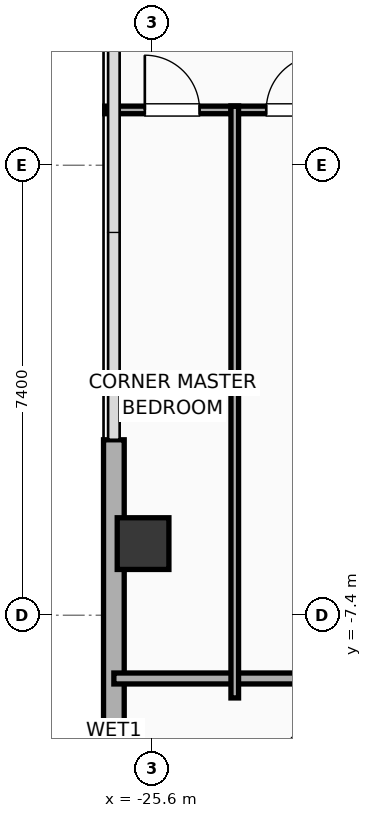
"""IFC4 building model, lengths in metres.
Left out: names, types, materials, properties, quantities, classifications, styles, units other than length and angle.
Written with IfcOpenShell. Run it as: python <this file> out.ifc"""

import sys

from ifc_helpers import new_model, si_unit, direction, frame, frame_2d, origin, origin_2d, place, context, subcontext, project, spatial, rectangle, hollow_rectangle, extrude, element, fill, save


model = new_model("IFC4")
c1 = context("Model", 3, precision=1e-05, world=origin(), true_north=direction((0.0, 1.0)))
c2 = subcontext(c1, "Body", "Model", "MODEL_VIEW")
j1 = project(units=[si_unit("LENGTHUNIT", "METRE"), si_unit("PLANEANGLEUNIT", "RADIAN")], contexts=[c1])
p1 = place(None, origin())
s1 = spatial("IfcSite", under=j1, at=p1, CompositionType="ELEMENT")
p2 = place(p1, origin())
s2 = spatial("IfcBuilding", under=s1, at=p2, CompositionType="ELEMENT")
p3 = place(p2, frame((0.0, 0.0, 211.9)))
s3 = spatial("IfcBuildingStorey", under=s2, at=p3, CompositionType="ELEMENT", Elevation=211.9)
p4 = place(p3, frame((-25.75, -6.222, 0.0), z_axis=(0.0, 0.0, 1.0), x_axis=(1.0, 0.0, 0.0)))
e1 = element("IfcColumn", 1, at=p4, inside=s3, PredefinedType="COLUMN", context=c2, shape_type="SweptSolid", body=[
    extrude(hollow_rectangle(XDim=0.85, YDim=0.85, WallThickness=0.028, at=origin_2d()), origin(), (0.0, 0.0, 1.0), 3.9),
])
p5 = place(p3, frame((-26.23, -15.383, 0.0), z_axis=(0.0, 0.0, 1.0), x_axis=(0.0, 1.0, 0.0)))
e2 = element("IfcWall", 2, at=p5, inside=s3, PredefinedType="ELEMENTEDWALL", context=c2, shape_type="SweptSolid", body=[
    extrude(rectangle(XDim=10.869, YDim=0.34, at=frame_2d((5.434, 0.0))), origin(), (0.0, 0.0, 1.0), 3.65),
])
p6 = place(p3, frame((-26.23, -8.44, 0.0), z_axis=(0.0, 0.0, 1.0), x_axis=(1.0, 0.0, 0.0)))
e3 = element("IfcWall", 3, at=p6, inside=s3, PredefinedType="PARTITIONING", context=c2, shape_type="SweptSolid", body=[
    extrude(rectangle(XDim=16.35, YDim=0.18, at=frame_2d((8.175, 0.0))), origin(), (0.0, 0.0, 1.0), 3.65),
])
p7 = place(p3, frame((-26.38, 0.91, 0.0), z_axis=(0.0, 0.0, 1.0), x_axis=(1.0, 0.0, 0.0)))
e4 = element("IfcWall", 4, at=p7, inside=s3, PredefinedType="PARTITIONING", context=c2, shape_type="SweptSolid", body=[
    extrude(rectangle(XDim=2.2, YDim=0.125, at=frame_2d((1.1, 0.0))), origin(), (0.0, 0.0, 1.0), 3.65),
])
p8 = place(p7, frame((0.659, 0.0, 0.0)))
e5 = element("IfcOpeningElement", 5, at=p8, cuts=e4, PredefinedType="OPENING", context=c2, shape_type="SweptSolid", body=[
    extrude(rectangle(XDim=0.9, YDim=2.05, at=frame_2d((0.45, 1.025))), frame((0.0, 0.073, 0.0), z_axis=(0.0, -1.0, 0.0), x_axis=(1.0, 0.0, 0.0)), (0.0, 0.0, 1.0), 0.145),
])
p9 = place(p3, frame((-24.304, 0.91, 0.0), z_axis=(0.0, 0.0, 1.0), x_axis=(1.0, 0.0, 0.0)))
e6 = element("IfcWall", 6, at=p9, inside=s3, PredefinedType="PARTITIONING", context=c2, shape_type="SweptSolid", body=[
    extrude(rectangle(XDim=2.061, YDim=0.125, at=frame_2d((1.031, 0.0))), origin(), (0.0, 0.0, 1.0), 3.65),
])
p10 = place(p9, frame((0.581, 0.0, 0.0)))
e7 = element("IfcOpeningElement", 7, at=p10, cuts=e6, PredefinedType="OPENING", context=c2, shape_type="SweptSolid", body=[
    extrude(rectangle(XDim=0.9, YDim=2.05, at=frame_2d((0.45, 1.025))), frame((0.0, 0.073, 0.0), z_axis=(0.0, -1.0, 0.0), x_axis=(1.0, 0.0, 0.0)), (0.0, 0.0, 1.0), 0.145),
])
p11 = place(p3, frame((-24.242, -8.76, 0.0), z_axis=(0.0, 0.0, 1.0), x_axis=(0.0, 1.0, 0.0)))
e8 = element("IfcWall", 8, at=p11, inside=s3, PredefinedType="PARTITIONING", context=c2, shape_type="SweptSolid", body=[
    extrude(rectangle(XDim=9.73, YDim=0.125, at=frame_2d((4.865, 0.0))), origin(), (0.0, 0.0, 1.0), 3.65),
])
p12 = place(p8, origin())
e9 = element("IfcDoor", 9, at=p12, inside=s3, OperationType="SINGLE_SWING_LEFT", PredefinedType="DOOR", context=c2, shape_type="SweptSolid", body=[
    extrude(rectangle(XDim=0.9, YDim=2.05, at=frame_2d((0.45, 1.025))), frame((0.0, 0.025, 0.0), z_axis=(0.0, -1.0, 0.0), x_axis=(1.0, 0.0, 0.0)), (0.0, 0.0, 1.0), 0.05),
])
fill(e5, e9)
p13 = place(p10, origin())
e10 = element("IfcDoor", 10, at=p13, inside=s3, OperationType="SINGLE_SWING_RIGHT", PredefinedType="DOOR", context=c2, shape_type="SweptSolid", body=[
    extrude(rectangle(XDim=0.9, YDim=2.05, at=frame_2d((0.45, 1.025))), frame((0.0, 0.025, 0.0), z_axis=(0.0, -1.0, 0.0), x_axis=(1.0, 0.0, 0.0)), (0.0, 0.0, 1.0), 0.05),
])
fill(e7, e10)
save(model, sys.argv[1])
